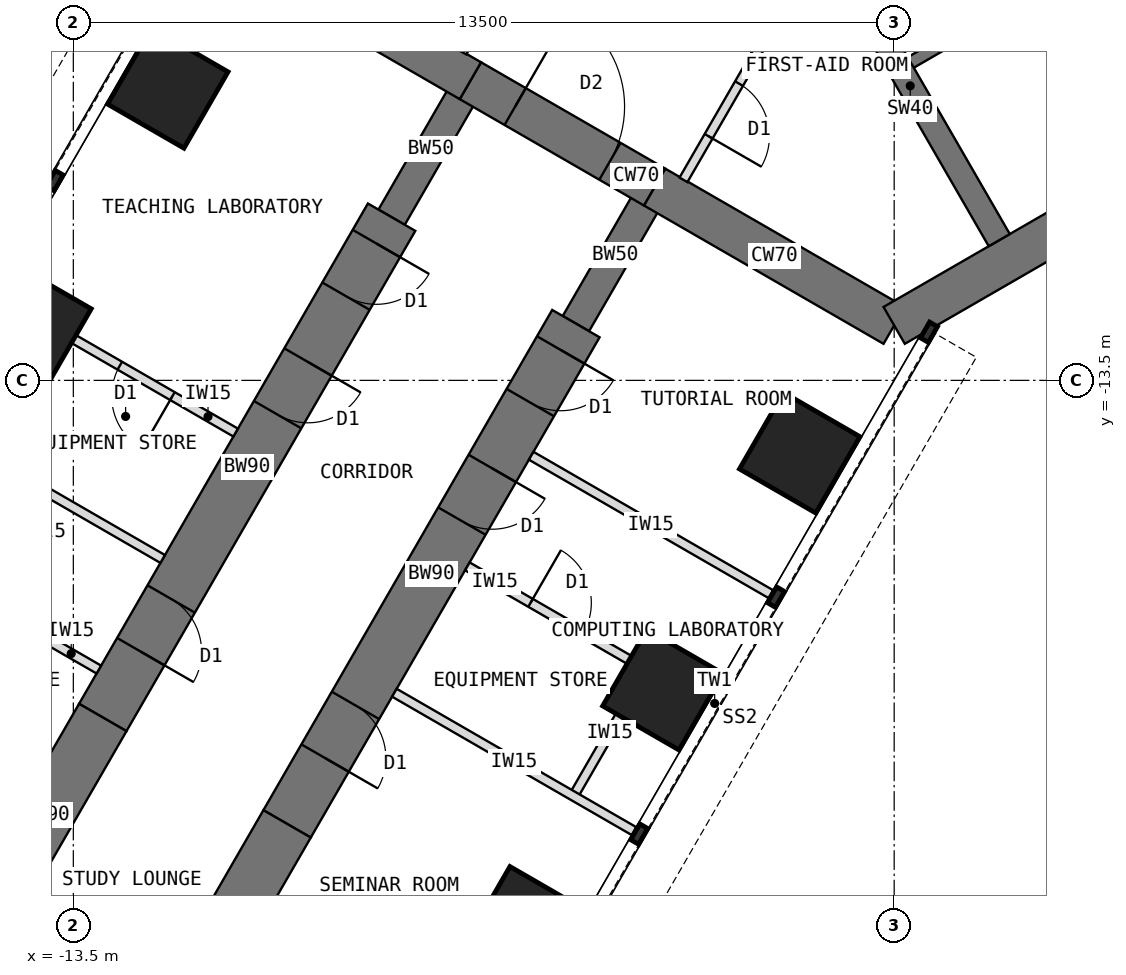
"""IFC4 building model, lengths in metres.
Left out: names, types, materials, properties, quantities, classifications, styles, units other than length and angle.
Written with IfcOpenShell. Run it as: python <this file> out.ifc"""

import sys

from ifc_helpers import new_model, si_unit, direction, frame, frame_2d, origin, origin_2d, place, context, subcontext, project, spatial, rectangle, extrude, element, fill, save


model = new_model("IFC4")
c1 = context("Model", 3, precision=1e-05, world=origin(), true_north=direction((0.0, 1.0)))
c2 = subcontext(c1, "Body", "Model", "MODEL_VIEW")
j1 = project(units=[si_unit("LENGTHUNIT", "METRE"), si_unit("PLANEANGLEUNIT", "RADIAN")], contexts=[c1])
p1 = place(None, origin())
s1 = spatial("IfcSite", under=j1, at=p1, CompositionType="ELEMENT")
p2 = place(p1, origin())
s2 = spatial("IfcBuilding", under=s1, at=p2, CompositionType="ELEMENT")
p3 = place(p2, frame((0.0, 0.0, 68.5)))
s3 = spatial("IfcBuildingStorey", under=s2, at=p3, CompositionType="ELEMENT", Elevation=68.5)
p4 = place(p3, frame((-10.908, -6.298, 0.0), z_axis=(0.0, 0.0, 1.0), x_axis=(0.866034513004, -0.499984222037, 0.0)))
e1 = element("IfcWall", 1, at=p4, inside=s3, PredefinedType="SHEAR", context=c2, shape_type="SweptSolid", body=[
    extrude(rectangle(XDim=4.548, YDim=0.7, at=frame_2d((2.274, 0.0))), origin(), (0.0, 0.0, 1.0), 4.0),
])
p5 = place(p3, frame((-6.97, -8.572, 0.0), z_axis=(0.0, 0.0, 1.0), x_axis=(0.866019471182, -0.500010275428, 0.0)))
e2 = element("IfcWall", 2, at=p5, inside=s3, PredefinedType="SHEAR", context=c2, shape_type="SweptSolid", body=[
    extrude(rectangle(XDim=3.5, YDim=0.7, at=frame_2d((1.75, 0.0))), origin(), (0.0, 0.0, 1.0), 4.0),
])
p6 = place(p5, frame((0.85, 0.0, 0.0)))
e3 = element("IfcOpeningElement", 3, at=p6, cuts=e2, PredefinedType="OPENING", context=c2, shape_type="SweptSolid", body=[
    extrude(rectangle(XDim=1.8, YDim=2.1, at=frame_2d((0.9, 1.05))), frame((0.0, 0.36, 0.0), z_axis=(0.0, -1.0, 0.0), x_axis=(1.0, 0.0, 0.0)), (0.0, 0.0, 1.0), 0.72),
])
p7 = place(p3, frame((-3.939, -10.322, 0.0), z_axis=(0.0, 0.0, 1.0), x_axis=(0.866011268655, -0.500024481964, 0.0)))
e4 = element("IfcWall", 4, at=p7, inside=s3, PredefinedType="SHEAR", context=c2, shape_type="SweptSolid", body=[
    extrude(rectangle(XDim=4.548, YDim=0.7, at=frame_2d((2.274, 0.0))), origin(), (0.0, 0.0, 1.0), 4.0),
])
p8 = place(p3, frame((0.0, -12.596, 0.0), z_axis=(0.0, 0.0, 1.0), x_axis=(0.866021940709, 0.500005998175, 0.0)))
e5 = element("IfcWall", 5, at=p8, inside=s3, PredefinedType="SHEAR", context=c2, shape_type="SweptSolid", body=[
    extrude(rectangle(XDim=12.596, YDim=0.7, at=frame_2d((6.298, 0.0))), origin(), (0.0, 0.0, 1.0), 4.0),
])
p9 = place(p3, frame((-3.939, -10.322, 0.0), z_axis=(0.0, 0.0, 1.0), x_axis=(-0.499918158782, -0.866072649678, 0.0)))
e6 = element("IfcWall", 6, at=p9, inside=s3, PredefinedType="SHEAR", context=c2, shape_type="SweptSolid", body=[
    extrude(rectangle(XDim=2.592, YDim=0.5, at=frame_2d((1.296, 0.0))), origin(), (0.0, 0.0, 1.0), 4.0),
])
p10 = place(p3, frame((-5.234, -12.566, 0.0), z_axis=(0.0, 0.0, 1.0), x_axis=(-0.499997557548, -0.86602681393, 0.0)))
e7 = element("IfcWall", 7, at=p10, inside=s3, PredefinedType="SHEAR", context=c2, shape_type="SweptSolid", body=[
    extrude(rectangle(XDim=9.5, YDim=0.9, at=frame_2d((4.75, 0.0))), origin(), (0.0, 0.0, 1.0), 4.0),
])
p11 = place(p10, frame((0.5, 0.0, 0.0)))
e8 = element("IfcOpeningElement", 8, at=p11, cuts=e7, PredefinedType="OPENING", context=c2, shape_type="SweptSolid", body=[
    extrude(rectangle(XDim=1.0, YDim=2.1, at=frame_2d((0.5, 1.05))), frame((0.0, 0.46, 0.0), z_axis=(0.0, -1.0, 0.0), x_axis=(1.0, 0.0, 0.0)), (0.0, 0.0, 1.0), 0.92),
])
p12 = place(p10, frame((2.75, 0.0, 0.0)))
e9 = element("IfcOpeningElement", 9, at=p12, cuts=e7, PredefinedType="OPENING", context=c2, shape_type="SweptSolid", body=[
    extrude(rectangle(XDim=1.0, YDim=2.1, at=frame_2d((0.5, 1.05))), frame((0.0, 0.46, 0.0), z_axis=(0.0, -1.0, 0.0), x_axis=(1.0, 0.0, 0.0)), (0.0, 0.0, 1.0), 0.92),
])
p13 = place(p10, frame((7.25, 0.0, 0.0)))
e10 = element("IfcOpeningElement", 10, at=p13, cuts=e7, PredefinedType="OPENING", context=c2, shape_type="SweptSolid", body=[
    extrude(rectangle(XDim=1.0, YDim=2.1, at=frame_2d((0.5, 1.05))), frame((0.0, 0.46, 0.0), z_axis=(0.0, -1.0, 0.0), x_axis=(1.0, 0.0, 0.0)), (0.0, 0.0, 1.0), 0.92),
])
p14 = place(p3, frame((-9.984, -20.794, 0.0), z_axis=(0.0, 0.0, 1.0), x_axis=(-0.500042316284, -0.866000971088, 0.0)))
e11 = element("IfcWall", 11, at=p14, inside=s3, PredefinedType="SHEAR", context=c2, shape_type="SweptSolid", body=[
    extrude(rectangle(XDim=3.7, YDim=0.9, at=frame_2d((1.85, 0.0))), origin(), (0.0, 0.0, 1.0), 4.0),
])
p15 = place(p3, frame((-6.97, -8.572, 0.0), z_axis=(0.0, 0.0, 1.0), x_axis=(-0.499988811324, -0.866031863473, 0.0)))
e12 = element("IfcWall", 12, at=p15, inside=s3, PredefinedType="SHEAR", context=c2, shape_type="SweptSolid", body=[
    extrude(rectangle(XDim=2.592, YDim=0.5, at=frame_2d((1.296, 0.0))), origin(), (0.0, 0.0, 1.0), 4.0),
])
p16 = place(p3, frame((-8.266, -10.816, 0.0), z_axis=(0.0, 0.0, 1.0), x_axis=(-0.499997557548, -0.86602681393, 0.0)))
e13 = element("IfcWall", 13, at=p16, inside=s3, PredefinedType="SHEAR", context=c2, shape_type="SweptSolid", body=[
    extrude(rectangle(XDim=9.5, YDim=0.9, at=frame_2d((4.75, 0.0))), origin(), (0.0, 0.0, 1.0), 4.0),
])
p17 = place(p16, frame((0.5, 0.0, 0.0)))
e14 = element("IfcOpeningElement", 14, at=p17, cuts=e13, PredefinedType="OPENING", context=c2, shape_type="SweptSolid", body=[
    extrude(rectangle(XDim=1.0, YDim=2.1, at=frame_2d((0.5, 1.05))), frame((0.0, 0.46, 0.0), z_axis=(0.0, -1.0, 0.0), x_axis=(1.0, 0.0, 0.0)), (0.0, 0.0, 1.0), 0.92),
])
p18 = place(p16, frame((2.75, 0.0, 0.0)))
e15 = element("IfcOpeningElement", 15, at=p18, cuts=e13, PredefinedType="OPENING", context=c2, shape_type="SweptSolid", body=[
    extrude(rectangle(XDim=1.0, YDim=2.1, at=frame_2d((0.5, 1.05))), frame((0.0, 0.46, 0.0), z_axis=(0.0, -1.0, 0.0), x_axis=(1.0, 0.0, 0.0)), (0.0, 0.0, 1.0), 0.92),
])
p19 = place(p16, frame((7.25, 0.0, 0.0)))
e16 = element("IfcOpeningElement", 16, at=p19, cuts=e13, PredefinedType="OPENING", context=c2, shape_type="SweptSolid", body=[
    extrude(rectangle(XDim=1.0, YDim=2.1, at=frame_2d((0.5, 1.05))), frame((0.0, 0.46, 0.0), z_axis=(0.0, -1.0, 0.0), x_axis=(1.0, 0.0, 0.0)), (0.0, 0.0, 1.0), 0.92),
])
p20 = place(p3, frame((-13.016, -19.044, 0.0), z_axis=(0.0, 0.0, 1.0), x_axis=(-0.499992827086, -0.866029545028, 0.0)))
e17 = element("IfcWall", 17, at=p20, inside=s3, PredefinedType="SHEAR", context=c2, shape_type="SweptSolid", body=[
    extrude(rectangle(XDim=3.7, YDim=0.9, at=frame_2d((1.85, 0.0))), origin(), (0.0, 0.0, 1.0), 4.0),
])
for number, where, z_axis, x_axis in (
    (18, (-1.554, -14.691, 0.0), (0.0, 0.0, 1.0), (0.5, 0.866, 0.0)),
    (19, (-11.946, -8.691, 0.0), (0.0, 0.0, 1.0), (0.5, 0.866, 0.0)),
    (20, (-3.804, -18.588, 0.0), (0.0, 0.0, 1.0), (0.5, 0.866, 0.0)),
    (21, (-14.196, -12.588, 0.0), (0.0, 0.0, 1.0), (0.5, 0.866, 0.0)),
    (22, (-6.054, -22.486, 0.0), (0.0, 0.0, 1.0), (0.5, 0.866, 0.0)),
):
    element("IfcColumn", number, at=place(p3, frame(where, z_axis=z_axis, x_axis=x_axis)), inside=s3, PredefinedType="COLUMN", context=c2, shape_type="SweptSolid", body=[
        extrude(rectangle(XDim=1.45, YDim=1.45, at=origin_2d()), origin(), (0.0, 0.0, 1.0), 4.0),
    ])
p21 = place(p3, frame((0.186, -8.322, 0.0), z_axis=(0.0, 0.0, 1.0), x_axis=(0.866026010844, 0.49999894854, 0.0)))
e23 = element("IfcWall", 23, at=p21, inside=s3, PredefinedType="SHEAR", context=c2, shape_type="SweptSolid", body=[
    extrude(rectangle(XDim=8.0, YDim=0.2, at=frame_2d((4.0, 0.0))), origin(), (0.0, 0.0, 1.0), 4.0),
])
p22 = place(p21, frame((6.7, 0.0, 0.0)))
e24 = element("IfcOpeningElement", 24, at=p22, cuts=e23, PredefinedType="OPENING", context=c2, shape_type="SweptSolid", body=[
    extrude(rectangle(XDim=1.1, YDim=2.1, at=frame_2d((0.55, 1.05))), frame((0.0, 0.11, 0.0), z_axis=(0.0, -1.0, 0.0), x_axis=(1.0, 0.0, 0.0)), (0.0, 0.0, 1.0), 0.22),
])
p23 = place(p3, frame((-1.201, -6.12, 0.0), z_axis=(0.0, 0.0, 1.0), x_axis=(0.500002627198, -0.866023886965, 0.0)))
e25 = element("IfcWall", 25, at=p23, inside=s3, PredefinedType="SHEAR", context=c2, shape_type="SweptSolid", body=[
    extrude(rectangle(XDim=5.858, YDim=0.4, at=frame_2d((2.929, 0.0))), origin(), (0.0, 0.0, 1.0), 4.0),
])
for number, where, z_axis, x_axis in (
    (26, (-5.97, -14.74, 0.0), (0.0, 0.0, 1.0), (0.866, -0.5, 0.0)),
    (27, (-8.22, -18.637, 0.0), (0.0, 0.0, 1.0), (0.866, -0.5, 0.0)),
):
    element("IfcWall", number, at=place(p3, frame(where, z_axis=z_axis, x_axis=x_axis)), inside=s3, PredefinedType="PARTITIONING", context=c2, shape_type="SweptSolid", body=[
        extrude(rectangle(XDim=4.55, YDim=0.15, at=frame_2d((2.275, 0.0))), origin(), (0.0, 0.0, 1.0), 3.8),
    ])
p24 = place(p3, frame((-4.075, -18.259, 0.0), z_axis=(0.0, 0.0, 1.0), x_axis=(-0.500001309137, -0.866024647952, 0.0)))
e28 = element("IfcWall", 28, at=p24, inside=s3, PredefinedType="PARTITIONING", context=c2, shape_type="SweptSolid", body=[
    extrude(rectangle(XDim=2.4, YDim=0.15, at=frame_2d((1.2, 0.0))), origin(), (0.0, 0.0, 1.0), 3.8),
])
p25 = place(p3, frame((-7.02, -16.559, 0.0), z_axis=(0.0, 0.0, 1.0), x_axis=(0.866038511948, -0.499977295307, 0.0)))
e29 = element("IfcWall", 29, at=p25, inside=s3, PredefinedType="PARTITIONING", context=c2, shape_type="SweptSolid", body=[
    extrude(rectangle(XDim=3.4, YDim=0.15, at=frame_2d((1.7, 0.0))), origin(), (0.0, 0.0, 1.0), 3.8),
])
p26 = place(p25, frame((1.2, 0.0, 0.0)))
e30 = element("IfcOpeningElement", 30, at=p26, cuts=e29, PredefinedType="OPENING", context=c2, shape_type="SweptSolid", body=[
    extrude(rectangle(XDim=1.0, YDim=2.1, at=frame_2d((0.5, 1.05))), frame((0.0, 0.085, 0.0), z_axis=(0.0, -1.0, 0.0), x_axis=(1.0, 0.0, 0.0)), (0.0, 0.0, 1.0), 0.17),
])
p27 = place(p3, frame((-12.03, -16.437, 0.0), z_axis=(0.0, 0.0, 1.0), x_axis=(-0.866035472144, 0.499982560684, 0.0)))
e31 = element("IfcWall", 31, at=p27, inside=s3, PredefinedType="PARTITIONING", context=c2, shape_type="SweptSolid", body=[
    extrude(rectangle(XDim=4.55, YDim=0.15, at=frame_2d((2.275, 0.0))), origin(), (0.0, 0.0, 1.0), 3.8),
])
p28 = place(p3, frame((-13.775, -12.658, 0.0), z_axis=(0.0, 0.0, 1.0), x_axis=(-0.500033551112, -0.866006032174, 0.0)))
e32 = element("IfcWall", 32, at=p28, inside=s3, PredefinedType="PARTITIONING", context=c2, shape_type="SweptSolid", body=[
    extrude(rectangle(XDim=2.4, YDim=0.15, at=frame_2d((1.2, 0.0))), origin(), (0.0, 0.0, 1.0), 3.8),
])
p29 = place(p3, frame((-10.83, -14.359, 0.0), z_axis=(0.0, 0.0, 1.0), x_axis=(-0.865989465428, 0.500062241894, 0.0)))
e33 = element("IfcWall", 33, at=p29, inside=s3, PredefinedType="PARTITIONING", context=c2, shape_type="SweptSolid", body=[
    extrude(rectangle(XDim=3.4, YDim=0.15, at=frame_2d((1.7, 0.0))), origin(), (0.0, 0.0, 1.0), 3.8),
])
p30 = place(p29, frame((1.2, 0.0, 0.0)))
e34 = element("IfcOpeningElement", 34, at=p30, cuts=e33, PredefinedType="OPENING", context=c2, shape_type="SweptSolid", body=[
    extrude(rectangle(XDim=1.0, YDim=2.1, at=frame_2d((0.5, 1.05))), frame((0.0, 0.085, 0.0), z_axis=(0.0, -1.0, 0.0), x_axis=(1.0, 0.0, 0.0)), (0.0, 0.0, 1.0), 0.17),
])
p31 = place(p3, frame((-13.08, -18.256, 0.0), z_axis=(0.0, 0.0, 1.0), x_axis=(-0.866020560687, 0.500008388397, 0.0)))
e35 = element("IfcWall", 35, at=p31, inside=s3, PredefinedType="PARTITIONING", context=c2, shape_type="SweptSolid", body=[
    extrude(rectangle(XDim=3.4, YDim=0.15, at=frame_2d((1.7, 0.0))), origin(), (0.0, 0.0, 1.0), 3.8),
])
p32 = place(p31, frame((1.2, 0.0, 0.0)))
e36 = element("IfcOpeningElement", 36, at=p32, cuts=e35, PredefinedType="OPENING", context=c2, shape_type="SweptSolid", body=[
    extrude(rectangle(XDim=1.0, YDim=2.1, at=frame_2d((0.5, 1.05))), frame((0.0, 0.085, 0.0), z_axis=(0.0, -1.0, 0.0), x_axis=(1.0, 0.0, 0.0)), (0.0, 0.0, 1.0), 0.17),
])
p33 = place(p3, frame((-1.253, -6.37, 0.0), z_axis=(0.0, 0.0, 1.0), x_axis=(-0.500007369519, -0.866021148949, 0.0)))
e37 = element("IfcWall", 37, at=p33, inside=s3, PredefinedType="PARTITIONING", context=c2, shape_type="SweptSolid", body=[
    extrude(rectangle(XDim=4.426, YDim=0.15, at=frame_2d((2.213, 0.0))), origin(), (0.0, 0.0, 1.0), 3.8),
])
p34 = place(p33, frame((2.598, 0.0, 0.0)))
e38 = element("IfcOpeningElement", 38, at=p34, cuts=e37, PredefinedType="OPENING", context=c2, shape_type="SweptSolid", body=[
    extrude(rectangle(XDim=1.0, YDim=2.1, at=frame_2d((0.5, 1.05))), frame((0.0, 0.085, 0.0), z_axis=(0.0, -1.0, 0.0), x_axis=(1.0, 0.0, 0.0)), (0.0, 0.0, 1.0), 0.17),
])
p35 = place(p3, frame((-7.103, -8.103, 0.0), z_axis=(0.0, 0.0, 1.0), x_axis=(0.500007369519, 0.866021148949, 0.0)))
e39 = element("IfcWall", 39, at=p35, inside=s3, PredefinedType="PARTITIONING", context=c2, shape_type="SweptSolid", body=[
    extrude(rectangle(XDim=4.426, YDim=0.15, at=frame_2d((2.213, 0.0))), origin(), (0.0, 0.0, 1.0), 3.8),
])
p36 = place(p35, frame((0.828, 0.0, 0.0)))
e40 = element("IfcOpeningElement", 40, at=p36, cuts=e39, PredefinedType="OPENING", context=c2, shape_type="SweptSolid", body=[
    extrude(rectangle(XDim=1.0, YDim=2.1, at=frame_2d((0.5, 1.05))), frame((0.0, 0.085, 0.0), z_axis=(0.0, -1.0, 0.0), x_axis=(1.0, 0.0, 0.0)), (0.0, 0.0, 1.0), 0.17),
])
p37 = place(p6, origin())
e41 = element("IfcDoor", 41, at=p37, inside=s3, OperationType="DOUBLE_DOOR_DOUBLE_SWING", PredefinedType="DOOR", context=c2, shape_type="SweptSolid", body=[
    extrude(rectangle(XDim=1.72, YDim=2.06, at=frame_2d((0.9, 1.03))), frame((0.0, 0.025, 0.0), z_axis=(0.0, -1.0, 0.0), x_axis=(1.0, 0.0, 0.0)), (0.0, 0.0, 1.0), 0.05),
    extrude(rectangle(XDim=0.04, YDim=2.1, at=frame_2d((0.02, 1.05))), frame((0.0, 0.35, 0.0), z_axis=(0.0, -1.0, 0.0), x_axis=(1.0, 0.0, 0.0)), (0.0, 0.0, 1.0), 0.699),
    extrude(rectangle(XDim=0.04, YDim=2.1, at=frame_2d((1.78, 1.05))), frame((0.0, 0.35, 0.0), z_axis=(0.0, -1.0, 0.0), x_axis=(1.0, 0.0, 0.0)), (0.0, 0.0, 1.0), 0.699),
    extrude(rectangle(XDim=1.72, YDim=0.04, at=frame_2d((0.9, 2.08))), frame((0.0, 0.35, 0.0), z_axis=(0.0, -1.0, 0.0), x_axis=(1.0, 0.0, 0.0)), (0.0, 0.0, 1.0), 0.699),
])
fill(e3, e41)
p38 = place(p26, origin())
e42 = element("IfcDoor", 42, at=p38, inside=s3, OperationType="SINGLE_SWING_LEFT", PredefinedType="DOOR", context=c2, shape_type="SweptSolid", body=[
    extrude(rectangle(XDim=1.0, YDim=2.1, at=frame_2d((0.5, 1.05))), frame((0.0, 0.025, 0.0), z_axis=(0.0, -1.0, 0.0), x_axis=(1.0, 0.0, 0.0)), (0.0, 0.0, 1.0), 0.05),
])
fill(e30, e42)
p39 = place(p30, origin())
e43 = element("IfcDoor", 43, at=p39, inside=s3, OperationType="SINGLE_SWING_LEFT", PredefinedType="DOOR", context=c2, shape_type="SweptSolid", body=[
    extrude(rectangle(XDim=1.0, YDim=2.1, at=frame_2d((0.5, 1.05))), frame((0.0, 0.025, 0.0), z_axis=(0.0, -1.0, 0.0), x_axis=(1.0, 0.0, 0.0)), (0.0, 0.0, 1.0), 0.05),
])
fill(e34, e43)
p40 = place(p34, origin())
e44 = element("IfcDoor", 44, at=p40, inside=s3, OperationType="SINGLE_SWING_RIGHT", PredefinedType="DOOR", context=c2, shape_type="SweptSolid", body=[
    extrude(rectangle(XDim=1.0, YDim=2.1, at=frame_2d((0.5, 1.05))), frame((0.0, 0.025, 0.0), z_axis=(0.0, -1.0, 0.0), x_axis=(1.0, 0.0, 0.0)), (0.0, 0.0, 1.0), 0.05),
])
fill(e38, e44)
p41 = place(p11, origin())
e45 = element("IfcDoor", 45, at=p41, inside=s3, OperationType="SINGLE_SWING_LEFT", PredefinedType="DOOR", context=c2, shape_type="SweptSolid", body=[
    extrude(rectangle(XDim=0.92, YDim=2.06, at=frame_2d((0.5, 1.03))), frame((0.0, 0.025, 0.0), z_axis=(0.0, -1.0, 0.0), x_axis=(1.0, 0.0, 0.0)), (0.0, 0.0, 1.0), 0.05),
    extrude(rectangle(XDim=0.04, YDim=2.1, at=frame_2d((0.02, 1.05))), frame((0.0, 0.45, 0.0), z_axis=(0.0, -1.0, 0.0), x_axis=(1.0, 0.0, 0.0)), (0.0, 0.0, 1.0), 0.899),
    extrude(rectangle(XDim=0.04, YDim=2.1, at=frame_2d((0.98, 1.05))), frame((0.0, 0.45, 0.0), z_axis=(0.0, -1.0, 0.0), x_axis=(1.0, 0.0, 0.0)), (0.0, 0.0, 1.0), 0.899),
    extrude(rectangle(XDim=0.92, YDim=0.04, at=frame_2d((0.5, 2.08))), frame((0.0, 0.45, 0.0), z_axis=(0.0, -1.0, 0.0), x_axis=(1.0, 0.0, 0.0)), (0.0, 0.0, 1.0), 0.899),
])
fill(e8, e45)
p42 = place(p12, origin())
e46 = element("IfcDoor", 46, at=p42, inside=s3, OperationType="SINGLE_SWING_LEFT", PredefinedType="DOOR", context=c2, shape_type="SweptSolid", body=[
    extrude(rectangle(XDim=0.92, YDim=2.06, at=frame_2d((0.5, 1.03))), frame((0.0, 0.025, 0.0), z_axis=(0.0, -1.0, 0.0), x_axis=(1.0, 0.0, 0.0)), (0.0, 0.0, 1.0), 0.05),
    extrude(rectangle(XDim=0.04, YDim=2.1, at=frame_2d((0.02, 1.05))), frame((0.0, 0.45, 0.0), z_axis=(0.0, -1.0, 0.0), x_axis=(1.0, 0.0, 0.0)), (0.0, 0.0, 1.0), 0.899),
    extrude(rectangle(XDim=0.04, YDim=2.1, at=frame_2d((0.98, 1.05))), frame((0.0, 0.45, 0.0), z_axis=(0.0, -1.0, 0.0), x_axis=(1.0, 0.0, 0.0)), (0.0, 0.0, 1.0), 0.899),
    extrude(rectangle(XDim=0.92, YDim=0.04, at=frame_2d((0.5, 2.08))), frame((0.0, 0.45, 0.0), z_axis=(0.0, -1.0, 0.0), x_axis=(1.0, 0.0, 0.0)), (0.0, 0.0, 1.0), 0.899),
])
fill(e9, e46)
p43 = place(p13, origin())
e47 = element("IfcDoor", 47, at=p43, inside=s3, OperationType="SINGLE_SWING_RIGHT", PredefinedType="DOOR", context=c2, shape_type="SweptSolid", body=[
    extrude(rectangle(XDim=0.92, YDim=2.06, at=frame_2d((0.5, 1.03))), frame((0.0, 0.025, 0.0), z_axis=(0.0, -1.0, 0.0), x_axis=(1.0, 0.0, 0.0)), (0.0, 0.0, 1.0), 0.05),
    extrude(rectangle(XDim=0.04, YDim=2.1, at=frame_2d((0.02, 1.05))), frame((0.0, 0.45, 0.0), z_axis=(0.0, -1.0, 0.0), x_axis=(1.0, 0.0, 0.0)), (0.0, 0.0, 1.0), 0.899),
    extrude(rectangle(XDim=0.04, YDim=2.1, at=frame_2d((0.98, 1.05))), frame((0.0, 0.45, 0.0), z_axis=(0.0, -1.0, 0.0), x_axis=(1.0, 0.0, 0.0)), (0.0, 0.0, 1.0), 0.899),
    extrude(rectangle(XDim=0.92, YDim=0.04, at=frame_2d((0.5, 2.08))), frame((0.0, 0.45, 0.0), z_axis=(0.0, -1.0, 0.0), x_axis=(1.0, 0.0, 0.0)), (0.0, 0.0, 1.0), 0.899),
])
fill(e10, e47)
p44 = place(p17, origin())
e48 = element("IfcDoor", 48, at=p44, inside=s3, OperationType="SINGLE_SWING_LEFT", PredefinedType="DOOR", context=c2, shape_type="SweptSolid", body=[
    extrude(rectangle(XDim=0.92, YDim=2.06, at=frame_2d((0.5, 1.03))), frame((0.0, 0.025, 0.0), z_axis=(0.0, -1.0, 0.0), x_axis=(1.0, 0.0, 0.0)), (0.0, 0.0, 1.0), 0.05),
    extrude(rectangle(XDim=0.04, YDim=2.1, at=frame_2d((0.02, 1.05))), frame((0.0, 0.45, 0.0), z_axis=(0.0, -1.0, 0.0), x_axis=(1.0, 0.0, 0.0)), (0.0, 0.0, 1.0), 0.899),
    extrude(rectangle(XDim=0.04, YDim=2.1, at=frame_2d((0.98, 1.05))), frame((0.0, 0.45, 0.0), z_axis=(0.0, -1.0, 0.0), x_axis=(1.0, 0.0, 0.0)), (0.0, 0.0, 1.0), 0.899),
    extrude(rectangle(XDim=0.92, YDim=0.04, at=frame_2d((0.5, 2.08))), frame((0.0, 0.45, 0.0), z_axis=(0.0, -1.0, 0.0), x_axis=(1.0, 0.0, 0.0)), (0.0, 0.0, 1.0), 0.899),
])
fill(e14, e48)
p45 = place(p18, origin())
e49 = element("IfcDoor", 49, at=p45, inside=s3, OperationType="SINGLE_SWING_LEFT", PredefinedType="DOOR", context=c2, shape_type="SweptSolid", body=[
    extrude(rectangle(XDim=0.92, YDim=2.06, at=frame_2d((0.5, 1.03))), frame((0.0, 0.025, 0.0), z_axis=(0.0, -1.0, 0.0), x_axis=(1.0, 0.0, 0.0)), (0.0, 0.0, 1.0), 0.05),
    extrude(rectangle(XDim=0.04, YDim=2.1, at=frame_2d((0.02, 1.05))), frame((0.0, 0.45, 0.0), z_axis=(0.0, -1.0, 0.0), x_axis=(1.0, 0.0, 0.0)), (0.0, 0.0, 1.0), 0.899),
    extrude(rectangle(XDim=0.04, YDim=2.1, at=frame_2d((0.98, 1.05))), frame((0.0, 0.45, 0.0), z_axis=(0.0, -1.0, 0.0), x_axis=(1.0, 0.0, 0.0)), (0.0, 0.0, 1.0), 0.899),
    extrude(rectangle(XDim=0.92, YDim=0.04, at=frame_2d((0.5, 2.08))), frame((0.0, 0.45, 0.0), z_axis=(0.0, -1.0, 0.0), x_axis=(1.0, 0.0, 0.0)), (0.0, 0.0, 1.0), 0.899),
])
fill(e15, e49)
p46 = place(p19, origin())
e50 = element("IfcDoor", 50, at=p46, inside=s3, OperationType="SINGLE_SWING_RIGHT", PredefinedType="DOOR", context=c2, shape_type="SweptSolid", body=[
    extrude(rectangle(XDim=0.92, YDim=2.06, at=frame_2d((0.5, 1.03))), frame((0.0, 0.025, 0.0), z_axis=(0.0, -1.0, 0.0), x_axis=(1.0, 0.0, 0.0)), (0.0, 0.0, 1.0), 0.05),
    extrude(rectangle(XDim=0.04, YDim=2.1, at=frame_2d((0.02, 1.05))), frame((0.0, 0.45, 0.0), z_axis=(0.0, -1.0, 0.0), x_axis=(1.0, 0.0, 0.0)), (0.0, 0.0, 1.0), 0.899),
    extrude(rectangle(XDim=0.04, YDim=2.1, at=frame_2d((0.98, 1.05))), frame((0.0, 0.45, 0.0), z_axis=(0.0, -1.0, 0.0), x_axis=(1.0, 0.0, 0.0)), (0.0, 0.0, 1.0), 0.899),
    extrude(rectangle(XDim=0.92, YDim=0.04, at=frame_2d((0.5, 2.08))), frame((0.0, 0.45, 0.0), z_axis=(0.0, -1.0, 0.0), x_axis=(1.0, 0.0, 0.0)), (0.0, 0.0, 1.0), 0.899),
])
fill(e16, e50)
save(model, sys.argv[1])
